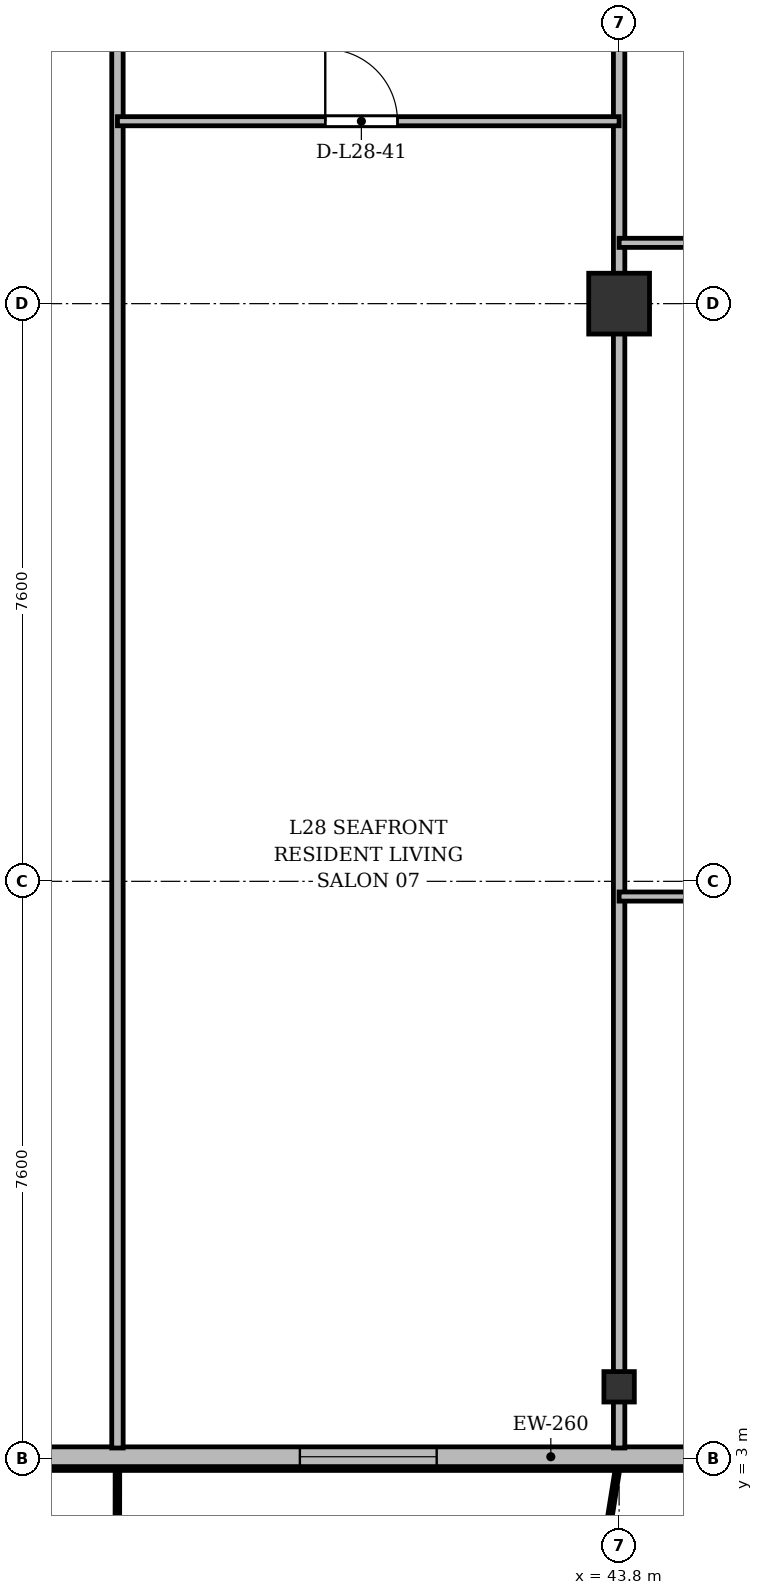
"""IFC4 building model, lengths in metres.
Left out: names, types, materials, properties, quantities, classifications, styles, units other than length and angle.
Written with IfcOpenShell. Run it as: python <this file> out.ifc"""

import sys

from ifc_helpers import new_model, si_unit, direction, frame, frame_2d, origin, origin_2d, place, context, subcontext, project, spatial, rectangle, i_section, extrude, source, transform, mapped, element, fill, save


model = new_model("IFC4")
c1 = context("Model", 3, precision=1e-05, world=origin(), true_north=direction((0.0, 1.0)))
c2 = subcontext(c1, "Body", "Model", "MODEL_VIEW")
j1 = project(units=[si_unit("LENGTHUNIT", "METRE"), si_unit("PLANEANGLEUNIT", "RADIAN")], contexts=[c1])
p1 = place(None, origin())
s1 = spatial("IfcSite", under=j1, at=p1, CompositionType="ELEMENT")
p2 = place(p1, origin())
s2 = spatial("IfcBuilding", under=s1, at=p2, CompositionType="ELEMENT")
p3 = place(p2, frame((0.0, 0.0, 110.5)))
s3 = spatial("IfcBuildingStorey", under=s2, at=p3, CompositionType="ELEMENT", Elevation=110.5)
m1 = source(origin(), c2, "Body", "SweptSolid", [
    extrude(i_section(OverallWidth=0.4, OverallDepth=0.4, WebThickness=0.022, FlangeThickness=0.035, at=origin_2d()), origin(), (0.0, 0.0, 1.0), 3.6),
])
p4 = place(p3, frame((43.8, 3.95, 0.0), z_axis=(0.0, 0.0, 1.0), x_axis=(1.0, 0.0, 0.0)))
e1 = element("IfcColumn", 1, at=p4, inside=s3, PredefinedType="COLUMN", context=c2, shape_type="MappedRepresentation", body=[
    mapped(m1, transform((0.0, 0.0, 0.0), x_axis=(1.0, 0.0, 0.0), y_axis=(0.0, 1.0, 0.0), z_axis=(0.0, 0.0, 1.0), scale=1.0)),
])
m2 = source(origin(), c2, "Body", "SweptSolid", [
    extrude(rectangle(XDim=0.8, YDim=0.8, at=origin_2d()), origin(), (0.0, 0.0, 1.0), 3.6),
])
p5 = place(p3, frame((43.8, 18.2, 0.0), z_axis=(0.0, 0.0, 1.0), x_axis=(1.0, 0.0, 0.0)))
e2 = element("IfcColumn", 2, at=p5, inside=s3, PredefinedType="COLUMN", context=c2, shape_type="MappedRepresentation", body=[
    mapped(m2, transform((0.0, 0.0, 0.0), x_axis=(1.0, 0.0, 0.0), y_axis=(0.0, 1.0, 0.0), z_axis=(0.0, 0.0, 1.0), scale=1.0)),
])
p6 = place(p3, frame((66.9, 3.03, 0.0), z_axis=(0.0, 0.0, 1.0), x_axis=(-1.0, 0.0, 0.0)))
e3 = element("IfcWall", 3, at=p6, inside=s3, PredefinedType="SOLIDWALL", context=c2, shape_type="SweptSolid", body=[
    extrude(rectangle(XDim=59.4, YDim=0.26, at=frame_2d((29.7, 0.0))), origin(), (0.0, 0.0, 1.0), 3.34),
])
p7 = place(p6, frame((2.175, 0.0, 0.9)))
e4 = element("IfcOpeningElement", 4, at=p7, cuts=e3, PredefinedType="OPENING", context=c2, shape_type="SweptSolid", body=[
    extrude(rectangle(XDim=1.65, YDim=1.85, at=frame_2d((0.825, 0.925))), frame((0.0, 0.14, 0.0), z_axis=(0.0, -1.0, 0.0), x_axis=(1.0, 0.0, 0.0)), (0.0, 0.0, 1.0), 0.28),
])
p8 = place(p6, frame((5.5, 0.0, 0.9)))
e5 = element("IfcOpeningElement", 5, at=p8, cuts=e3, PredefinedType="OPENING", context=c2, shape_type="SweptSolid", body=[
    extrude(rectangle(XDim=1.8, YDim=1.8, at=frame_2d((0.9, 0.9))), frame((0.0, 0.14, 0.0), z_axis=(0.0, -1.0, 0.0), x_axis=(1.0, 0.0, 0.0)), (0.0, 0.0, 1.0), 0.28),
])
p9 = place(p6, frame((9.213, 0.0, 0.0)))
e6 = element("IfcOpeningElement", 6, at=p9, cuts=e3, PredefinedType="OPENING", context=c2, shape_type="SweptSolid", body=[
    extrude(rectangle(XDim=1.2, YDim=2.2, at=frame_2d((0.6, 1.1))), frame((0.0, 0.14, 0.0), z_axis=(0.0, -1.0, 0.0), x_axis=(1.0, 0.0, 0.0)), (0.0, 0.0, 1.0), 0.28),
])
p10 = place(p6, frame((13.15, 0.0, 0.9)))
e7 = element("IfcOpeningElement", 7, at=p10, cuts=e3, PredefinedType="OPENING", context=c2, shape_type="SweptSolid", body=[
    extrude(rectangle(XDim=1.5, YDim=1.75, at=frame_2d((0.75, 0.875))), frame((0.0, 0.14, 0.0), z_axis=(0.0, -1.0, 0.0), x_axis=(1.0, 0.0, 0.0)), (0.0, 0.0, 1.0), 0.28),
])
p11 = place(p6, frame((16.7, 0.0, 0.9)))
e8 = element("IfcOpeningElement", 8, at=p11, cuts=e3, PredefinedType="OPENING", context=c2, shape_type="SweptSolid", body=[
    extrude(rectangle(XDim=2.0, YDim=1.95, at=frame_2d((1.0, 0.975))), frame((0.0, 0.14, 0.0), z_axis=(0.0, -1.0, 0.0), x_axis=(1.0, 0.0, 0.0)), (0.0, 0.0, 1.0), 0.28),
])
p12 = place(p6, frame((20.475, 0.0, 0.9)))
e9 = element("IfcOpeningElement", 9, at=p12, cuts=e3, PredefinedType="OPENING", context=c2, shape_type="SweptSolid", body=[
    extrude(rectangle(XDim=1.65, YDim=1.85, at=frame_2d((0.825, 0.925))), frame((0.0, 0.14, 0.0), z_axis=(0.0, -1.0, 0.0), x_axis=(1.0, 0.0, 0.0)), (0.0, 0.0, 1.0), 0.28),
])
p13 = place(p6, frame((25.5, 0.0, 0.9)))
e10 = element("IfcOpeningElement", 10, at=p13, cuts=e3, PredefinedType="OPENING", context=c2, shape_type="SweptSolid", body=[
    extrude(rectangle(XDim=1.8, YDim=1.8, at=frame_2d((0.9, 0.9))), frame((0.0, 0.14, 0.0), z_axis=(0.0, -1.0, 0.0), x_axis=(1.0, 0.0, 0.0)), (0.0, 0.0, 1.0), 0.28),
])
p14 = place(p6, frame((31.9, 0.0, 0.9)))
e11 = element("IfcOpeningElement", 11, at=p14, cuts=e3, PredefinedType="OPENING", context=c2, shape_type="SweptSolid", body=[
    extrude(rectangle(XDim=2.2, YDim=1.8, at=frame_2d((1.1, 0.9))), frame((0.0, 0.14, 0.0), z_axis=(0.0, -1.0, 0.0), x_axis=(1.0, 0.0, 0.0)), (0.0, 0.0, 1.0), 0.28),
])
p15 = place(p6, frame((37.584, 0.0, 0.0)))
e12 = element("IfcOpeningElement", 12, at=p15, cuts=e3, PredefinedType="OPENING", context=c2, shape_type="SweptSolid", body=[
    extrude(rectangle(XDim=1.2, YDim=2.2, at=frame_2d((0.6, 1.1))), frame((0.0, 0.14, 0.0), z_axis=(0.0, -1.0, 0.0), x_axis=(1.0, 0.0, 0.0)), (0.0, 0.0, 1.0), 0.28),
])
p16 = place(p6, frame((40.6, 0.0, 0.9)))
e13 = element("IfcOpeningElement", 13, at=p16, cuts=e3, PredefinedType="OPENING", context=c2, shape_type="SweptSolid", body=[
    extrude(rectangle(XDim=2.0, YDim=1.95, at=frame_2d((1.0, 0.975))), frame((0.0, 0.14, 0.0), z_axis=(0.0, -1.0, 0.0), x_axis=(1.0, 0.0, 0.0)), (0.0, 0.0, 1.0), 0.28),
])
p17 = place(p6, frame((46.575, 0.0, 0.9)))
e14 = element("IfcOpeningElement", 14, at=p17, cuts=e3, PredefinedType="OPENING", context=c2, shape_type="SweptSolid", body=[
    extrude(rectangle(XDim=1.65, YDim=1.85, at=frame_2d((0.825, 0.925))), frame((0.0, 0.14, 0.0), z_axis=(0.0, -1.0, 0.0), x_axis=(1.0, 0.0, 0.0)), (0.0, 0.0, 1.0), 0.28),
])
p18 = place(p6, frame((55.817, 0.0, 0.0)))
e15 = element("IfcOpeningElement", 15, at=p18, cuts=e3, PredefinedType="OPENING", context=c2, shape_type="SweptSolid", body=[
    extrude(rectangle(XDim=1.2, YDim=2.2, at=frame_2d((0.6, 1.1))), frame((0.0, 0.14, 0.0), z_axis=(0.0, -1.0, 0.0), x_axis=(1.0, 0.0, 0.0)), (0.0, 0.0, 1.0), 0.28),
])
p19 = place(p3, frame((37.2, 3.145, 0.0), z_axis=(0.0, 0.0, 1.0), x_axis=(0.0, 1.0, 0.0)))
e16 = element("IfcWall", 16, at=p19, inside=s3, PredefinedType="PARTITIONING", context=c2, shape_type="SweptSolid", body=[
    extrude(rectangle(XDim=24.455, YDim=0.15, at=frame_2d((12.228, 0.0))), origin(), (0.0, 0.0, 1.0), 2.752),
])
p20 = place(p3, frame((43.8, 3.145, 0.0), z_axis=(0.0, 0.0, 1.0), x_axis=(0.0, 1.0, 0.0)))
e17 = element("IfcWall", 17, at=p20, inside=s3, PredefinedType="PARTITIONING", context=c2, shape_type="SweptSolid", body=[
    extrude(rectangle(XDim=24.455, YDim=0.15, at=frame_2d((12.228, 0.0))), origin(), (0.0, 0.0, 1.0), 2.84),
])
p21 = place(p3, frame((37.2, 20.6, 0.0), z_axis=(0.0, 0.0, 1.0), x_axis=(1.0, 0.0, 0.0)))
e18 = element("IfcWall", 18, at=p21, inside=s3, PredefinedType="PARTITIONING", context=c2, shape_type="SweptSolid", body=[
    extrude(rectangle(XDim=6.6, YDim=0.12, at=frame_2d((3.3, 0.0))), origin(), (0.0, 0.0, 1.0), 2.84),
])
p22 = place(p21, frame((2.734, 0.0, 0.0)))
e19 = element("IfcOpeningElement", 19, at=p22, cuts=e18, PredefinedType="OPENING", context=c2, shape_type="SweptSolid", body=[
    extrude(rectangle(XDim=0.95, YDim=2.15, at=frame_2d((0.475, 1.075))), frame((0.0, 0.07, 0.0), z_axis=(0.0, -1.0, 0.0), x_axis=(1.0, 0.0, 0.0)), (0.0, 0.0, 1.0), 0.14),
])
p23 = place(p3, frame((43.8, 19.0, 0.0), z_axis=(0.0, 0.0, 1.0), x_axis=(1.0, 0.0, 0.0)))
e20 = element("IfcWall", 20, at=p23, inside=s3, PredefinedType="PARTITIONING", context=c2, shape_type="SweptSolid", body=[
    extrude(rectangle(XDim=7.2, YDim=0.12, at=frame_2d((3.6, 0.0))), origin(), (0.0, 0.0, 1.0), 2.84),
])
p24 = place(p23, frame((3.125, 0.0, 0.0)))
e21 = element("IfcOpeningElement", 21, at=p24, cuts=e20, PredefinedType="OPENING", context=c2, shape_type="SweptSolid", body=[
    extrude(rectangle(XDim=0.95, YDim=2.15, at=frame_2d((0.475, 1.075))), frame((0.0, 0.07, 0.0), z_axis=(0.0, -1.0, 0.0), x_axis=(1.0, 0.0, 0.0)), (0.0, 0.0, 1.0), 0.14),
])
p25 = place(p3, frame((43.8, 10.4, 0.0), z_axis=(0.0, 0.0, 1.0), x_axis=(1.0, 0.0, 0.0)))
e22 = element("IfcWall", 22, at=p25, inside=s3, PredefinedType="PARTITIONING", context=c2, shape_type="SweptSolid", body=[
    extrude(rectangle(XDim=3.6, YDim=0.12, at=frame_2d((1.8, 0.0))), origin(), (0.0, 0.0, 1.0), 2.84),
])
p26 = place(p25, frame((1.325, 0.0, 0.0)))
e23 = element("IfcOpeningElement", 23, at=p26, cuts=e22, PredefinedType="OPENING", context=c2, shape_type="SweptSolid", body=[
    extrude(rectangle(XDim=0.95, YDim=2.15, at=frame_2d((0.475, 1.075))), frame((0.0, 0.07, 0.0), z_axis=(0.0, -1.0, 0.0), x_axis=(1.0, 0.0, 0.0)), (0.0, 0.0, 1.0), 0.14),
])
m3 = source(origin(), c2, "Body", "SweptSolid", [
    extrude(rectangle(XDim=1.8, YDim=1.8, at=frame_2d((0.9, 0.9))), frame((0.0, 0.03, 0.0), z_axis=(0.0, -1.0, 0.0), x_axis=(1.0, 0.0, 0.0)), (0.0, 0.0, 1.0), 0.06),
])
p27 = place(p13, origin())
e24 = element("IfcWindow", 24, at=p27, inside=s3, PartitioningType="SINGLE_PANEL", PredefinedType="WINDOW", context=c2, shape_type="MappedRepresentation", body=[
    mapped(m3, transform((0.0, 0.0, 0.0), x_axis=(1.0, 0.0, 0.0), y_axis=(0.0, 1.0, 0.0), z_axis=(0.0, 0.0, 1.0), scale=1.0)),
])
fill(e10, e24)
m4 = source(origin(), c2, "Body", "SweptSolid", [
    extrude(rectangle(XDim=0.95, YDim=2.15, at=frame_2d((0.475, 1.075))), frame((0.0, 0.025, 0.0), z_axis=(0.0, -1.0, 0.0), x_axis=(1.0, 0.0, 0.0)), (0.0, 0.0, 1.0), 0.05),
])
p28 = place(p22, origin())
e25 = element("IfcDoor", 25, at=p28, inside=s3, OperationType="SINGLE_SWING_LEFT", PredefinedType="DOOR", context=c2, shape_type="MappedRepresentation", body=[
    mapped(m4, transform((0.0, 0.0, 0.0), x_axis=(1.0, 0.0, 0.0), y_axis=(0.0, 1.0, 0.0), z_axis=(0.0, 0.0, 1.0), scale=1.0)),
])
fill(e19, e25)
save(model, sys.argv[1])
